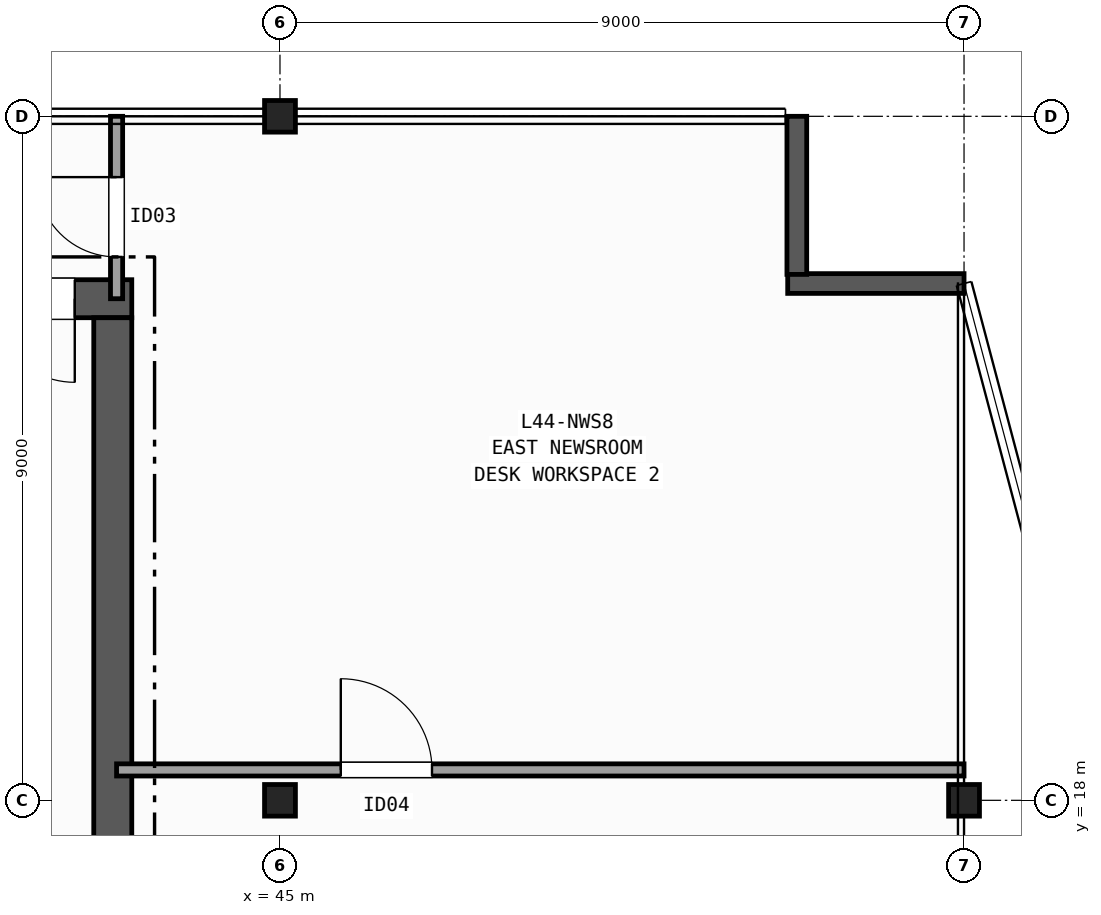
"""IFC4 building model, lengths in metres.
Left out: names, types, materials, properties, quantities, classifications, styles, units other than length and angle.
Written with IfcOpenShell. Run it as: python <this file> out.ifc"""

import sys

from ifc_helpers import new_model, si_unit, direction, frame, frame_2d, origin, origin_2d, place, context, subcontext, project, spatial, rectangle, i_section, extrude, element, fill, save


model = new_model("IFC4")
c1 = context("Model", 3, precision=1e-05, world=origin(), true_north=direction((0.0, 1.0)))
c2 = subcontext(c1, "Body", "Model", "MODEL_VIEW")
j1 = project(units=[si_unit("LENGTHUNIT", "METRE"), si_unit("PLANEANGLEUNIT", "RADIAN")], contexts=[c1])
p1 = place(None, origin())
s1 = spatial("IfcSite", under=j1, at=p1, CompositionType="ELEMENT")
p2 = place(p1, origin())
s2 = spatial("IfcBuilding", under=s1, at=p2, CompositionType="ELEMENT")
p3 = place(p2, frame((0.0, 0.0, 177.9)))
s3 = spatial("IfcBuildingStorey", under=s2, at=p3, CompositionType="ELEMENT", Elevation=177.9)
for number, where, z_axis, x_axis in (
    (1, (45.0, 18.0, 0.0), (0.0, 0.0, 1.0), (1.0, 0.0, 0.0)),
    (2, (45.0, 27.0, 0.0), (0.0, 0.0, 1.0), (1.0, 0.0, 0.0)),
    (3, (54.0, 18.0, 0.0), (0.0, 0.0, 1.0), (1.0, 0.0, 0.0)),
):
    element("IfcColumn", number, at=place(p3, frame(where, z_axis=z_axis, x_axis=x_axis)), inside=s3, PredefinedType="COLUMN", context=c2, shape_type="SweptSolid", body=[
        extrude(i_section(OverallWidth=0.406, OverallDepth=0.416, WebThickness=0.03, FlangeThickness=0.048, FilletRadius=0.015, at=origin_2d()), origin(), (0.0, 0.0, 1.0), 3.7),
    ])
p4 = place(p3, frame((54.0, 24.8, 0.0), z_axis=(0.0, 0.0, 1.0), x_axis=(-1.0, 0.0, 0.0)))
e4 = element("IfcWall", 4, at=p4, inside=s3, PredefinedType="SOLIDWALL", context=c2, shape_type="SweptSolid", body=[
    extrude(rectangle(XDim=2.32, YDim=0.26, at=frame_2d((1.16, 0.0))), origin(), (0.0, 0.0, 1.0), 3.42),
])
p5 = place(p3, frame((51.8, 24.92, 0.0), z_axis=(0.0, 0.0, 1.0), x_axis=(0.0, 1.0, 0.0)))
e5 = element("IfcWall", 5, at=p5, inside=s3, PredefinedType="SOLIDWALL", context=c2, shape_type="SweptSolid", body=[
    extrude(rectangle(XDim=2.08, YDim=0.26, at=frame_2d((1.04, 0.0))), origin(), (0.0, 0.0, 1.0), 3.42),
])
p6 = place(p3, frame((43.05, 24.6, 0.0), z_axis=(0.0, 0.0, 1.0), x_axis=(-1.0, 0.0, 0.0)))
e6 = element("IfcWall", 6, at=p6, inside=s3, PredefinedType="SHEAR", context=c2, shape_type="SweptSolid", body=[
    extrude(rectangle(XDim=13.9, YDim=0.5, at=frame_2d((6.95, 0.0))), origin(), (0.0, 0.0, 1.0), 3.42),
])
p7 = place(p6, frame((0.75, 0.0, 0.0)))
e7 = element("IfcOpeningElement", 7, at=p7, cuts=e6, PredefinedType="OPENING", context=c2, shape_type="SweptSolid", body=[
    extrude(rectangle(XDim=1.1, YDim=2.15, at=frame_2d((0.55, 1.075))), frame((0.0, 0.26, 0.0), z_axis=(0.0, -1.0, 0.0), x_axis=(1.0, 0.0, 0.0)), (0.0, 0.0, 1.0), 0.52),
])
p8 = place(p6, frame((2.25, 0.0, 0.0)))
e8 = element("IfcOpeningElement", 8, at=p8, cuts=e6, PredefinedType="OPENING", context=c2, shape_type="SweptSolid", body=[
    extrude(rectangle(XDim=0.9, YDim=2.1, at=frame_2d((0.45, 1.05))), frame((0.0, 0.26, 0.0), z_axis=(0.0, -1.0, 0.0), x_axis=(1.0, 0.0, 0.0)), (0.0, 0.0, 1.0), 0.52),
])
p9 = place(p6, frame((3.55, 0.0, 0.0)))
e9 = element("IfcOpeningElement", 9, at=p9, cuts=e6, PredefinedType="OPENING", context=c2, shape_type="SweptSolid", body=[
    extrude(rectangle(XDim=0.9, YDim=2.1, at=frame_2d((0.45, 1.05))), frame((0.0, 0.26, 0.0), z_axis=(0.0, -1.0, 0.0), x_axis=(1.0, 0.0, 0.0)), (0.0, 0.0, 1.0), 0.52),
])
p10 = place(p6, frame((4.9, 0.0, 0.0)))
e10 = element("IfcOpeningElement", 10, at=p10, cuts=e6, PredefinedType="OPENING", context=c2, shape_type="SweptSolid", body=[
    extrude(rectangle(XDim=0.9, YDim=2.1, at=frame_2d((0.45, 1.05))), frame((0.0, 0.26, 0.0), z_axis=(0.0, -1.0, 0.0), x_axis=(1.0, 0.0, 0.0)), (0.0, 0.0, 1.0), 0.52),
])
p11 = place(p3, frame((42.8, 11.45, 0.0), z_axis=(0.0, 0.0, 1.0), x_axis=(0.0, 1.0, 0.0)))
e11 = element("IfcWall", 11, at=p11, inside=s3, PredefinedType="SHEAR", context=c2, shape_type="SweptSolid", body=[
    extrude(rectangle(XDim=12.9, YDim=0.5, at=frame_2d((6.45, 0.0))), origin(), (0.0, 0.0, 1.0), 3.42),
])
p12 = place(p3, frame((42.85, 24.6, 0.0), z_axis=(0.0, 0.0, 1.0), x_axis=(0.0, 1.0, 0.0)))
e12 = element("IfcWall", 12, at=p12, inside=s3, PredefinedType="PARTITIONING", context=c2, shape_type="SweptSolid", body=[
    extrude(rectangle(XDim=2.4, YDim=0.16, at=frame_2d((1.2, 0.0))), origin(), (0.0, 0.0, 1.0), 2.634),
])
p13 = place(p12, frame((0.55, 0.0, 0.0)))
e13 = element("IfcOpeningElement", 13, at=p13, cuts=e12, PredefinedType="OPENING", context=c2, shape_type="SweptSolid", body=[
    extrude(rectangle(XDim=1.05, YDim=2.15, at=frame_2d((0.525, 1.075))), frame((0.0, 0.09, 0.0), z_axis=(0.0, -1.0, 0.0), x_axis=(1.0, 0.0, 0.0)), (0.0, 0.0, 1.0), 0.18),
])
p14 = place(p3, frame((42.85, 18.4, 0.0), z_axis=(0.0, 0.0, 1.0), x_axis=(1.0, 0.0, 0.0)))
e14 = element("IfcWall", 14, at=p14, inside=s3, PredefinedType="PARTITIONING", context=c2, shape_type="SweptSolid", body=[
    extrude(rectangle(XDim=11.15, YDim=0.16, at=frame_2d((5.575, 0.0))), origin(), (0.0, 0.0, 1.0), 3.42),
])
p15 = place(p14, frame((2.95, 0.0, 0.0)))
e15 = element("IfcOpeningElement", 15, at=p15, cuts=e14, PredefinedType="OPENING", context=c2, shape_type="SweptSolid", body=[
    extrude(rectangle(XDim=1.2, YDim=2.15, at=frame_2d((0.6, 1.075))), frame((0.0, 0.09, 0.0), z_axis=(0.0, -1.0, 0.0), x_axis=(1.0, 0.0, 0.0)), (0.0, 0.0, 1.0), 0.18),
])
p16 = place(p7, origin())
e16 = element("IfcDoor", 16, at=p16, inside=s3, OperationType="SINGLE_SWING_LEFT", PredefinedType="DOOR", context=c2, shape_type="SweptSolid", body=[
    extrude(rectangle(XDim=1.1, YDim=2.15, at=frame_2d((0.55, 1.075))), frame((0.0, 0.025, 0.0), z_axis=(0.0, -1.0, 0.0), x_axis=(1.0, 0.0, 0.0)), (0.0, 0.0, 1.0), 0.05),
])
fill(e7, e16)
p17 = place(p13, origin())
e17 = element("IfcDoor", 17, at=p17, inside=s3, OperationType="SINGLE_SWING_RIGHT", PredefinedType="DOOR", context=c2, shape_type="SweptSolid", body=[
    extrude(rectangle(XDim=1.05, YDim=2.15, at=frame_2d((0.525, 1.075))), frame((0.0, 0.025, 0.0), z_axis=(0.0, -1.0, 0.0), x_axis=(1.0, 0.0, 0.0)), (0.0, 0.0, 1.0), 0.05),
])
fill(e13, e17)
p18 = place(p15, origin())
e18 = element("IfcDoor", 18, at=p18, inside=s3, OperationType="SINGLE_SWING_LEFT", PredefinedType="DOOR", context=c2, shape_type="SweptSolid", body=[
    extrude(rectangle(XDim=1.2, YDim=2.15, at=frame_2d((0.6, 1.075))), frame((0.0, 0.025, 0.0), z_axis=(0.0, -1.0, 0.0), x_axis=(1.0, 0.0, 0.0)), (0.0, 0.0, 1.0), 0.05),
])
fill(e15, e18)
save(model, sys.argv[1])
